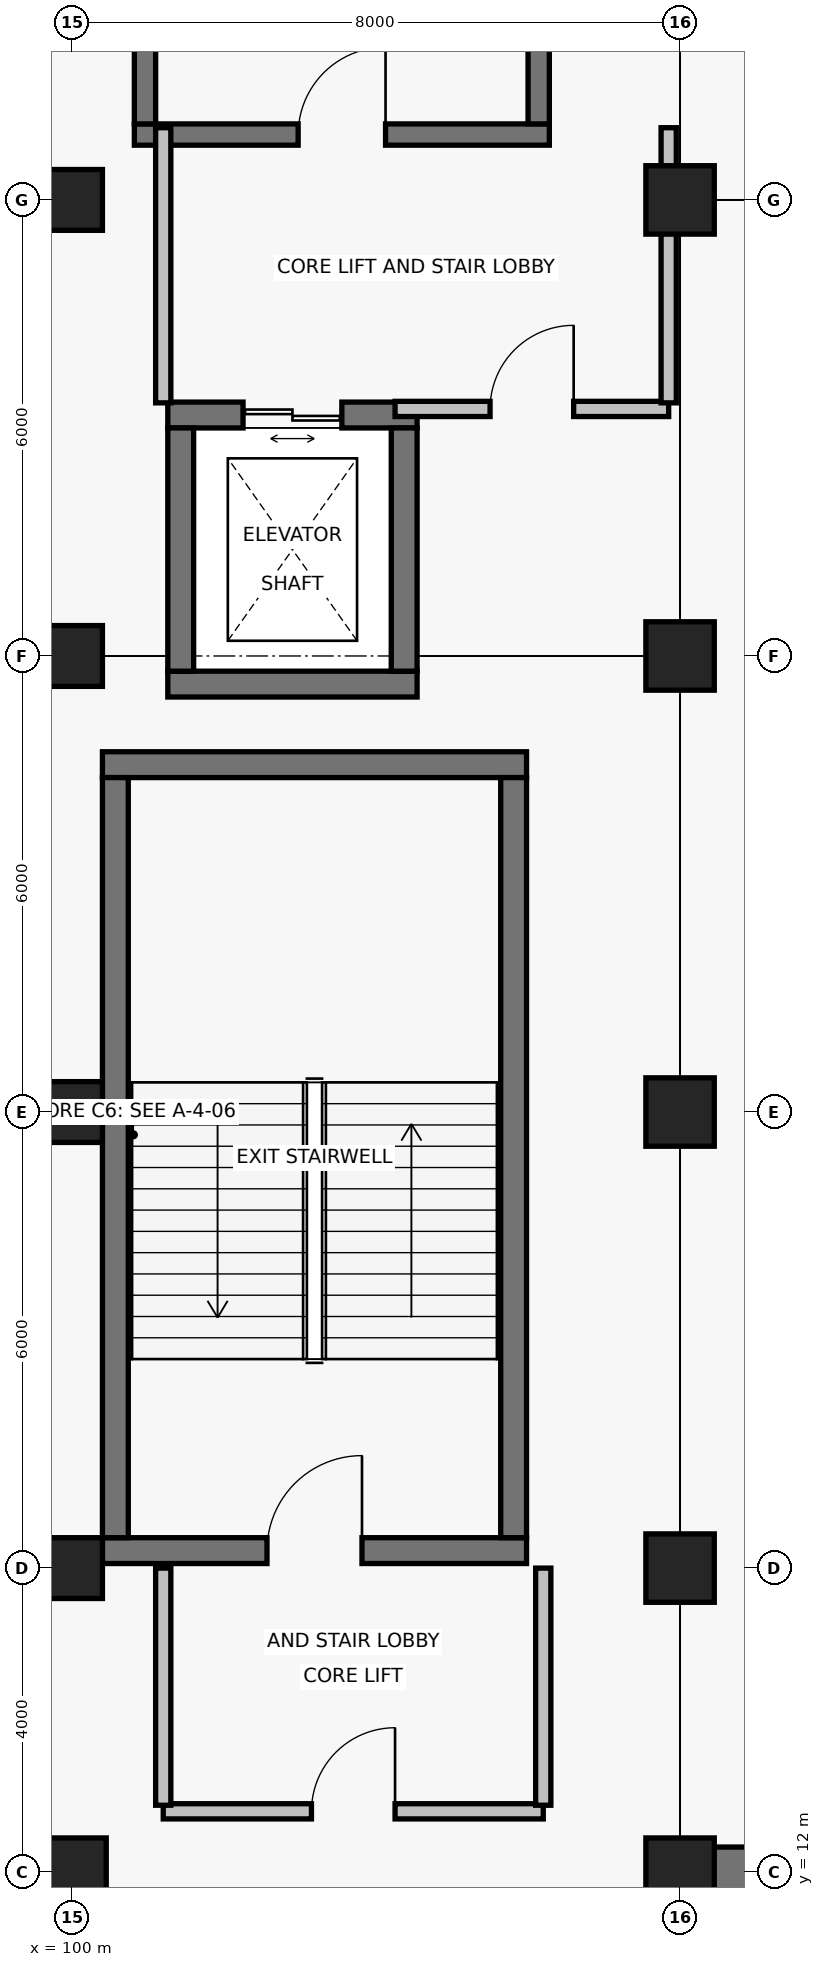
"""IFC4 building model, lengths in metres.
Left out: names, types, materials, properties, quantities, classifications, styles, units other than length and angle.
Written with IfcOpenShell. Run it as: python <this file> out.ifc"""

import sys

from ifc_helpers import new_model, si_unit, direction, frame, frame_2d, origin, origin_2d, place, context, subcontext, project, spatial, rectangle, extrude, element, fill, save


model = new_model("IFC4")
c1 = context("Model", 3, precision=1e-05, world=origin(), true_north=direction((0.0, 1.0)))
c2 = subcontext(c1, "Body", "Model", "MODEL_VIEW")
j1 = project(units=[si_unit("LENGTHUNIT", "METRE"), si_unit("PLANEANGLEUNIT", "RADIAN")], contexts=[c1])
p1 = place(None, origin())
s1 = spatial("IfcSite", under=j1, at=p1, CompositionType="ELEMENT")
p2 = place(p1, origin())
s2 = spatial("IfcBuilding", under=s1, at=p2, CompositionType="ELEMENT")
p3 = place(p2, frame((0.0, 0.0, -4.8)))
s3 = spatial("IfcBuildingStorey", under=s2, at=p3, CompositionType="ELEMENT", Elevation=-4.8)
p4 = place(p3, frame((100.0, 12.0, 0.0), z_axis=(0.0, 0.0, 1.0), x_axis=(1.0, 0.0, 0.0)))
e1 = element("IfcColumn", 1, at=p4, inside=s3, PredefinedType="COLUMN", context=c2, shape_type="SweptSolid", body=[
    extrude(rectangle(XDim=0.9, YDim=0.9, at=origin_2d()), origin(), (0.0, 0.0, 1.0), 4.8),
])
for number, where, z_axis, x_axis in (
    (2, (100.0, 16.0, 0.0), (0.0, 0.0, 1.0), (1.0, 0.0, 0.0)),
    (3, (100.0, 22.0, 0.0), (0.0, 0.0, 1.0), (1.0, 0.0, 0.0)),
    (4, (100.0, 28.0, 0.0), (0.0, 0.0, 1.0), (1.0, 0.0, 0.0)),
    (5, (100.0, 34.0, 0.0), (0.0, 0.0, 1.0), (1.0, 0.0, 0.0)),
):
    element("IfcColumn", number, at=place(p3, frame(where, z_axis=z_axis, x_axis=x_axis)), inside=s3, PredefinedType="COLUMN", context=c2, shape_type="SweptSolid", body=[
        extrude(rectangle(XDim=0.8, YDim=0.8, at=origin_2d()), origin(), (0.0, 0.0, 1.0), 4.8),
    ])
for number, where, z_axis, x_axis in (
    (6, (108.0, 12.0, 0.0), (0.0, 0.0, 1.0), (1.0, 0.0, 0.0)),
    (7, (108.0, 16.0, 0.0), (0.0, 0.0, 1.0), (1.0, 0.0, 0.0)),
    (8, (108.0, 22.0, 0.0), (0.0, 0.0, 1.0), (1.0, 0.0, 0.0)),
    (9, (108.0, 28.0, 0.0), (0.0, 0.0, 1.0), (1.0, 0.0, 0.0)),
    (10, (108.0, 34.0, 0.0), (0.0, 0.0, 1.0), (1.0, 0.0, 0.0)),
):
    element("IfcColumn", number, at=place(p3, frame(where, z_axis=z_axis, x_axis=x_axis)), inside=s3, PredefinedType="COLUMN", context=c2, shape_type="SweptSolid", body=[
        extrude(rectangle(XDim=0.9, YDim=0.9, at=origin_2d()), origin(), (0.0, 0.0, 1.0), 4.8),
    ])
p5 = place(p3, frame((108.0, 0.0, 0.0), z_axis=(0.0, 0.0, 1.0), x_axis=(0.0, 1.0, 0.0)))
e11 = element("IfcWall", 11, at=p5, inside=s3, PredefinedType="USERDEFINED", context=c2, shape_type="SweptSolid", body=[
    extrude(rectangle(XDim=12.0, YDim=0.66, at=frame_2d((6.0, 0.0))), origin(), (0.0, 0.0, 1.0), 4.4),
])
p6 = place(p3, frame((108.0, 12.0, 0.0), z_axis=(0.0, 0.0, 1.0), x_axis=(1.0, 0.0, 0.0)))
e12 = element("IfcWall", 12, at=p6, inside=s3, PredefinedType="USERDEFINED", context=c2, shape_type="SweptSolid", body=[
    extrude(rectangle(XDim=30.0, YDim=0.66, at=frame_2d((15.0, 0.0))), origin(), (0.0, 0.0, 1.0), 4.4),
])
p7 = place(p3, frame((100.4, 16.23, 0.0), z_axis=(0.0, 0.0, 1.0), x_axis=(1.0, 0.0, 0.0)))
e13 = element("IfcWall", 13, at=p7, inside=s3, PredefinedType="SHEAR", context=c2, shape_type="SweptSolid", body=[
    extrude(rectangle(XDim=5.58, YDim=0.34, at=frame_2d((2.79, 0.0))), origin(), (0.0, 0.0, 1.0), 4.4),
])
p8 = place(p7, frame((2.165, 0.0, 0.0)))
e14 = element("IfcOpeningElement", 14, at=p8, cuts=e13, PredefinedType="OPENING", context=c2, shape_type="SweptSolid", body=[
    extrude(rectangle(XDim=1.25, YDim=2.2, at=frame_2d((0.625, 1.1))), frame((0.0, 0.185, 0.0), z_axis=(0.0, -1.0, 0.0), x_axis=(1.0, 0.0, 0.0)), (0.0, 0.0, 1.0), 0.37),
])
p9 = place(p3, frame((105.98, 26.57, 0.0), z_axis=(0.0, 0.0, 1.0), x_axis=(-1.0, 0.0, 0.0)))
e15 = element("IfcWall", 15, at=p9, inside=s3, PredefinedType="SHEAR", context=c2, shape_type="SweptSolid", body=[
    extrude(rectangle(XDim=5.58, YDim=0.34, at=frame_2d((2.79, 0.0))), origin(), (0.0, 0.0, 1.0), 4.4),
])
for number, where, z_axis, x_axis in (
    (16, (100.57, 26.4, 0.0), (0.0, 0.0, 1.0), (0.0, -1.0, 0.0)),
    (17, (105.81, 16.4, 0.0), (0.0, 0.0, 1.0), (0.0, 1.0, 0.0)),
):
    element("IfcWall", number, at=place(p3, frame(where, z_axis=z_axis, x_axis=x_axis)), inside=s3, PredefinedType="SHEAR", context=c2, shape_type="SweptSolid", body=[
        extrude(rectangle(XDim=10.0, YDim=0.34, at=frame_2d((5.0, 0.0))), origin(), (0.0, 0.0, 1.0), 4.4),
    ])
p10 = place(p3, frame((101.2, 12.8, 0.0), z_axis=(0.0, 0.0, 1.0), x_axis=(1.0, 0.0, 0.0)))
e18 = element("IfcWall", 18, at=p10, inside=s3, PredefinedType="PARTITIONING", context=c2, shape_type="SweptSolid", body=[
    extrude(rectangle(XDim=5.0, YDim=0.2, at=frame_2d((2.5, 0.0))), origin(), (0.0, 0.0, 1.0), 4.077),
])
p11 = place(p10, frame((1.95, 0.0, 0.0)))
e19 = element("IfcOpeningElement", 19, at=p11, cuts=e18, PredefinedType="OPENING", context=c2, shape_type="SweptSolid", body=[
    extrude(rectangle(XDim=1.1, YDim=2.15, at=frame_2d((0.55, 1.075))), frame((0.0, 0.115, 0.0), z_axis=(0.0, -1.0, 0.0), x_axis=(1.0, 0.0, 0.0)), (0.0, 0.0, 1.0), 0.23),
])
for number, where, z_axis, x_axis in (
    (20, (101.2, 16.0, 0.0), (0.0, 0.0, 1.0), (0.0, -1.0, 0.0)),
    (21, (106.2, 12.88, 0.0), (0.0, 0.0, 1.0), (0.0, 1.0, 0.0)),
):
    element("IfcWall", number, at=place(p3, frame(where, z_axis=z_axis, x_axis=x_axis)), inside=s3, PredefinedType="PARTITIONING", context=c2, shape_type="SweptSolid", body=[
        extrude(rectangle(XDim=3.12, YDim=0.2, at=frame_2d((1.56, 0.0))), origin(), (0.0, 0.0, 1.0), 3.18),
    ])
p12 = place(p3, frame((100.82, 34.86, 0.0), z_axis=(0.0, 0.0, 1.0), x_axis=(1.0, 0.0, 0.0)))
e22 = element("IfcWall", 22, at=p12, inside=s3, PredefinedType="SHEAR", context=c2, shape_type="SweptSolid", body=[
    extrude(rectangle(XDim=5.46, YDim=0.28, at=frame_2d((2.73, 0.0))), origin(), (0.0, 0.0, 1.0), 4.4),
])
p13 = place(p12, frame((2.155, 0.0, 0.0)))
e23 = element("IfcOpeningElement", 23, at=p13, cuts=e22, PredefinedType="OPENING", context=c2, shape_type="SweptSolid", body=[
    extrude(rectangle(XDim=1.15, YDim=2.15, at=frame_2d((0.575, 1.075))), frame((0.0, 0.155, 0.0), z_axis=(0.0, -1.0, 0.0), x_axis=(1.0, 0.0, 0.0)), (0.0, 0.0, 1.0), 0.31),
])
for number, where, z_axis, x_axis in (
    (24, (100.96, 45.0, 0.0), (0.0, 0.0, 1.0), (0.0, -1.0, 0.0)),
    (25, (106.14, 35.0, 0.0), (0.0, 0.0, 1.0), (0.0, 1.0, 0.0)),
):
    element("IfcWall", number, at=place(p3, frame(where, z_axis=z_axis, x_axis=x_axis)), inside=s3, PredefinedType="SHEAR", context=c2, shape_type="SweptSolid", body=[
        extrude(rectangle(XDim=10.0, YDim=0.28, at=frame_2d((5.0, 0.0))), origin(), (0.0, 0.0, 1.0), 4.4),
    ])
p14 = place(p3, frame((101.26, 27.63, 0.0), z_axis=(0.0, 0.0, 1.0), x_axis=(1.0, 0.0, 0.0)))
e26 = element("IfcWall", 26, at=p14, inside=s3, PredefinedType="SHEAR", context=c2, shape_type="SweptSolid", body=[
    extrude(rectangle(XDim=3.28, YDim=0.34, at=frame_2d((1.64, 0.0))), origin(), (0.0, 0.0, 1.0), 4.4),
])
p15 = place(p3, frame((104.54, 31.17, 0.0), z_axis=(0.0, 0.0, 1.0), x_axis=(-1.0, 0.0, 0.0)))
e27 = element("IfcWall", 27, at=p15, inside=s3, PredefinedType="SHEAR", context=c2, shape_type="SweptSolid", body=[
    extrude(rectangle(XDim=3.28, YDim=0.34, at=frame_2d((1.64, 0.0))), origin(), (0.0, 0.0, 1.0), 4.4),
])
p16 = place(p15, frame((0.99, 0.0, 0.0)))
e28 = element("IfcOpeningElement", 28, at=p16, cuts=e27, PredefinedType="OPENING", context=c2, shape_type="SweptSolid", body=[
    extrude(rectangle(XDim=1.3, YDim=2.25, at=frame_2d((0.65, 1.125))), frame((0.0, 0.185, 0.0), z_axis=(0.0, -1.0, 0.0), x_axis=(1.0, 0.0, 0.0)), (0.0, 0.0, 1.0), 0.37),
])
for number, where, z_axis, x_axis in (
    (29, (101.43, 31.0, 0.0), (0.0, 0.0, 1.0), (0.0, -1.0, 0.0)),
    (30, (104.37, 27.8, 0.0), (0.0, 0.0, 1.0), (0.0, 1.0, 0.0)),
):
    element("IfcWall", number, at=place(p3, frame(where, z_axis=z_axis, x_axis=x_axis)), inside=s3, PredefinedType="SHEAR", context=c2, shape_type="SweptSolid", body=[
        extrude(rectangle(XDim=3.2, YDim=0.34, at=frame_2d((1.6, 0.0))), origin(), (0.0, 0.0, 1.0), 4.4),
    ])
p17 = place(p3, frame((104.25, 31.25, 0.0), z_axis=(0.0, 0.0, 1.0), x_axis=(1.0, 0.0, 0.0)))
e31 = element("IfcWall", 31, at=p17, inside=s3, PredefinedType="PARTITIONING", context=c2, shape_type="SweptSolid", body=[
    extrude(rectangle(XDim=3.6, YDim=0.2, at=frame_2d((1.8, 0.0))), origin(), (0.0, 0.0, 1.0), 3.87),
])
p18 = place(p17, frame((1.25, 0.0, 0.0)))
e32 = element("IfcOpeningElement", 32, at=p18, cuts=e31, PredefinedType="OPENING", context=c2, shape_type="SweptSolid", body=[
    extrude(rectangle(XDim=1.1, YDim=2.15, at=frame_2d((0.55, 1.075))), frame((0.0, 0.115, 0.0), z_axis=(0.0, -1.0, 0.0), x_axis=(1.0, 0.0, 0.0)), (0.0, 0.0, 1.0), 0.23),
])
for number, where, z_axis, x_axis in (
    (33, (101.2, 34.95, 0.0), (0.0, 0.0, 1.0), (0.0, -1.0, 0.0)),
    (34, (107.85, 31.33, 0.0), (0.0, 0.0, 1.0), (0.0, 1.0, 0.0)),
):
    element("IfcWall", number, at=place(p3, frame(where, z_axis=z_axis, x_axis=x_axis)), inside=s3, PredefinedType="PARTITIONING", context=c2, shape_type="SweptSolid", body=[
        extrude(rectangle(XDim=3.62, YDim=0.2, at=frame_2d((1.81, 0.0))), origin(), (0.0, 0.0, 1.0), 3.18),
    ])
p19 = place(p8, origin())
e35 = element("IfcDoor", 35, at=p19, inside=s3, OperationType="SINGLE_SWING_RIGHT", PredefinedType="DOOR", context=c2, shape_type="SweptSolid", body=[
    extrude(rectangle(XDim=1.25, YDim=2.2, at=frame_2d((0.625, 1.1))), frame((0.0, 0.025, 0.0), z_axis=(0.0, -1.0, 0.0), x_axis=(1.0, 0.0, 0.0)), (0.0, 0.0, 1.0), 0.05),
])
fill(e14, e35)
p20 = place(p11, origin())
e36 = element("IfcDoor", 36, at=p20, inside=s3, OperationType="SINGLE_SWING_RIGHT", PredefinedType="DOOR", context=c2, shape_type="SweptSolid", body=[
    extrude(rectangle(XDim=1.1, YDim=2.15, at=frame_2d((0.55, 1.075))), frame((0.0, 0.025, 0.0), z_axis=(0.0, -1.0, 0.0), x_axis=(1.0, 0.0, 0.0)), (0.0, 0.0, 1.0), 0.05),
])
fill(e19, e36)
p21 = place(p13, origin())
e37 = element("IfcDoor", 37, at=p21, inside=s3, OperationType="SINGLE_SWING_RIGHT", PredefinedType="DOOR", context=c2, shape_type="SweptSolid", body=[
    extrude(rectangle(XDim=1.15, YDim=2.15, at=frame_2d((0.575, 1.075))), frame((0.0, 0.025, 0.0), z_axis=(0.0, -1.0, 0.0), x_axis=(1.0, 0.0, 0.0)), (0.0, 0.0, 1.0), 0.05),
])
fill(e23, e37)
p22 = place(p16, origin())
e38 = element("IfcDoor", 38, at=p22, inside=s3, OperationType="DOUBLE_DOOR_SLIDING", PredefinedType="DOOR", context=c2, shape_type="SweptSolid", body=[
    extrude(rectangle(XDim=1.3, YDim=2.25, at=frame_2d((0.65, 1.125))), frame((0.0, 0.025, 0.0), z_axis=(0.0, -1.0, 0.0), x_axis=(1.0, 0.0, 0.0)), (0.0, 0.0, 1.0), 0.05),
])
fill(e28, e38)
p23 = place(p18, origin())
e39 = element("IfcDoor", 39, at=p23, inside=s3, OperationType="SINGLE_SWING_RIGHT", PredefinedType="DOOR", context=c2, shape_type="SweptSolid", body=[
    extrude(rectangle(XDim=1.1, YDim=2.15, at=frame_2d((0.55, 1.075))), frame((0.0, 0.025, 0.0), z_axis=(0.0, -1.0, 0.0), x_axis=(1.0, 0.0, 0.0)), (0.0, 0.0, 1.0), 0.05),
])
fill(e32, e39)
save(model, sys.argv[1])
